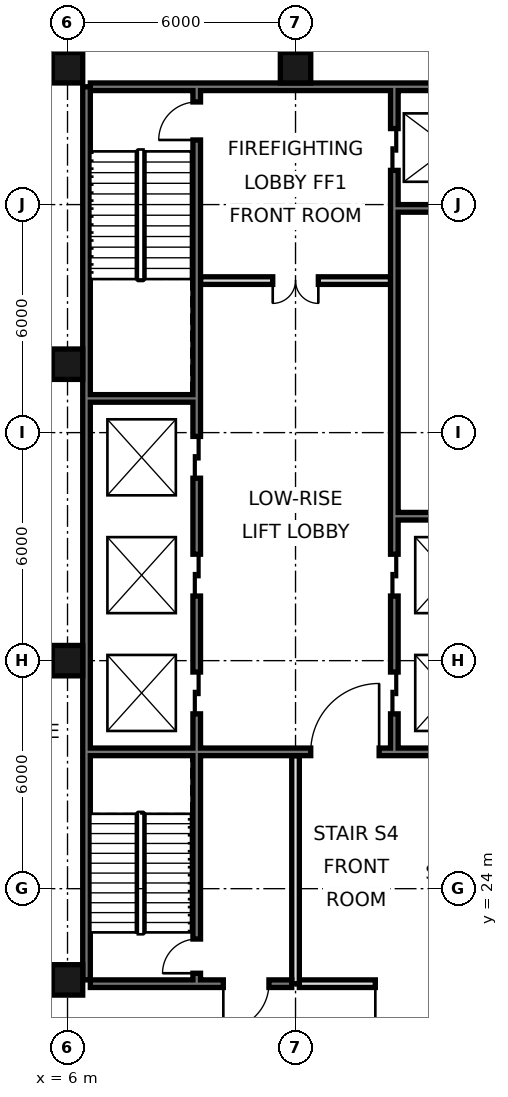
"""IFC4 building model, lengths in metres.
Left out: names, types, materials, properties, quantities, classifications, styles, units other than length and angle.
Written with IfcOpenShell. Run it as: python <this file> out.ifc"""

import sys

from ifc_helpers import new_model, si_unit, direction, frame, frame_2d, origin, origin_2d, place, context, subcontext, project, spatial, rectangle, hollow_rectangle, extrude, element, fill, save


model = new_model("IFC4")
c1 = context("Model", 3, precision=1e-05, world=origin(), true_north=direction((0.0, 1.0)))
c2 = subcontext(c1, "Body", "Model", "MODEL_VIEW")
j1 = project(units=[si_unit("LENGTHUNIT", "METRE"), si_unit("PLANEANGLEUNIT", "RADIAN")], contexts=[c1])
p1 = place(None, origin())
s1 = spatial("IfcSite", under=j1, at=p1, CompositionType="ELEMENT")
p2 = place(p1, origin())
s2 = spatial("IfcBuilding", under=s1, at=p2, CompositionType="ELEMENT")
p3 = place(p2, frame((0.0, 0.0, -13.5)))
s3 = spatial("IfcBuildingStorey", under=s2, at=p3, CompositionType="ELEMENT", Elevation=-13.5)
for number, where, z_axis, x_axis in (
    (1, (6.0, 21.6, 0.0), (0.0, 0.0, 1.0), (1.0, 0.0, 0.0)),
    (2, (6.0, 30.0, 0.0), (0.0, 0.0, 1.0), (1.0, 0.0, 0.0)),
    (3, (6.0, 37.8, 0.0), (0.0, 0.0, 1.0), (1.0, 0.0, 0.0)),
    (4, (6.0, 45.6, 0.0), (0.0, 0.0, 1.0), (1.0, 0.0, 0.0)),
    (5, (12.0, 45.6, 0.0), (0.0, 0.0, 1.0), (1.0, 0.0, 0.0)),
):
    element("IfcColumn", number, at=place(p3, frame(where, z_axis=z_axis, x_axis=x_axis)), inside=s3, PredefinedType="COLUMN", context=c2, shape_type="SweptSolid", body=[
        extrude(hollow_rectangle(XDim=0.8, YDim=0.8, WallThickness=0.07, at=origin_2d()), origin(), (0.0, 0.0, 1.0), 4.5),
    ])
p4 = place(p3, frame((6.5, 21.6, 0.0), z_axis=(0.0, 0.0, 1.0), x_axis=(0.0, 1.0, 0.0)))
e6 = element("IfcWall", 6, at=p4, inside=s3, PredefinedType="SOLIDWALL", context=c2, shape_type="SweptSolid", body=[
    extrude(rectangle(XDim=23.5, YDim=0.2, at=frame_2d((11.75, 0.0))), origin(), (0.0, 0.0, 1.0), 4.15),
])
p5 = place(p3, frame((6.6, 45.1, 0.0), z_axis=(0.0, 0.0, 1.0), x_axis=(1.0, 0.0, 0.0)))
e7 = element("IfcWall", 7, at=p5, inside=s3, PredefinedType="SOLIDWALL", context=c2, shape_type="SweptSolid", body=[
    extrude(rectangle(XDim=34.8, YDim=0.2, at=frame_2d((17.4, 0.0))), origin(), (0.0, 0.0, 1.0), 4.15),
])
p6 = place(p3, frame((12.1, 21.5, 0.0), z_axis=(0.0, 0.0, 1.0), x_axis=(1.0, 0.0, 0.0)))
e8 = element("IfcWall", 8, at=p6, inside=s3, PredefinedType="SOLIDWALL", context=c2, shape_type="SweptSolid", body=[
    extrude(rectangle(XDim=23.8, YDim=0.2, at=frame_2d((11.9, 0.0))), origin(), (0.0, 0.0, 1.0), 3.05),
])
p7 = place(p6, frame((2.0, 0.0, 0.0)))
e9 = element("IfcOpeningElement", 9, at=p7, cuts=e8, PredefinedType="OPENING", context=c2, shape_type="SweptSolid", body=[
    extrude(rectangle(XDim=1.8, YDim=2.1, at=frame_2d((0.9, 1.05))), frame((0.0, 0.11, 0.0), z_axis=(0.0, -1.0, 0.0), x_axis=(1.0, 0.0, 0.0)), (0.0, 0.0, 1.0), 0.22),
])
p8 = place(p6, frame((11.0, 0.0, 0.0)))
e10 = element("IfcOpeningElement", 10, at=p8, cuts=e8, PredefinedType="OPENING", context=c2, shape_type="SweptSolid", body=[
    extrude(rectangle(XDim=1.8, YDim=2.1, at=frame_2d((0.9, 1.05))), frame((0.0, 0.11, 0.0), z_axis=(0.0, -1.0, 0.0), x_axis=(1.0, 0.0, 0.0)), (0.0, 0.0, 1.0), 0.22),
])
p9 = place(p6, frame((20.0, 0.0, 0.0)))
e11 = element("IfcOpeningElement", 11, at=p9, cuts=e8, PredefinedType="OPENING", context=c2, shape_type="SweptSolid", body=[
    extrude(rectangle(XDim=1.8, YDim=2.1, at=frame_2d((0.9, 1.05))), frame((0.0, 0.11, 0.0), z_axis=(0.0, -1.0, 0.0), x_axis=(1.0, 0.0, 0.0)), (0.0, 0.0, 1.0), 0.22),
])
p10 = place(p3, frame((12.0, 21.5, 0.0), z_axis=(0.0, 0.0, 1.0), x_axis=(0.0, 1.0, 0.0)))
e12 = element("IfcWall", 12, at=p10, inside=s3, PredefinedType="PARTITIONING", context=c2, shape_type="SweptSolid", body=[
    extrude(rectangle(XDim=6.0, YDim=0.2, at=frame_2d((3.0, 0.0))), origin(), (0.0, 0.0, 1.0), 3.05),
])
p11 = place(p3, frame((14.6, 27.7, 0.0), z_axis=(0.0, 0.0, 1.0), x_axis=(0.0, 1.0, 0.0)))
e13 = element("IfcWall", 13, at=p11, inside=s3, PredefinedType="SOLIDWALL", context=c2, shape_type="SweptSolid", body=[
    extrude(rectangle(XDim=17.3, YDim=0.2, at=frame_2d((8.65, 0.0))), origin(), (0.0, 0.0, 1.0), 4.15),
])
p12 = place(p11, frame((0.9, 0.0, 0.0)))
e14 = element("IfcOpeningElement", 14, at=p12, cuts=e13, PredefinedType="OPENING", context=c2, shape_type="SweptSolid", body=[
    extrude(rectangle(XDim=1.1, YDim=2.1, at=frame_2d((0.55, 1.05))), frame((0.0, 0.11, 0.0), z_axis=(0.0, -1.0, 0.0), x_axis=(1.0, 0.0, 0.0)), (0.0, 0.0, 1.0), 0.22),
])
p13 = place(p11, frame((4.0, 0.0, 0.0)))
e15 = element("IfcOpeningElement", 15, at=p13, cuts=e13, PredefinedType="OPENING", context=c2, shape_type="SweptSolid", body=[
    extrude(rectangle(XDim=1.1, YDim=2.1, at=frame_2d((0.55, 1.05))), frame((0.0, 0.11, 0.0), z_axis=(0.0, -1.0, 0.0), x_axis=(1.0, 0.0, 0.0)), (0.0, 0.0, 1.0), 0.22),
])
p14 = place(p11, frame((15.2, 0.0, 0.0)))
e16 = element("IfcOpeningElement", 16, at=p14, cuts=e13, PredefinedType="OPENING", context=c2, shape_type="SweptSolid", body=[
    extrude(rectangle(XDim=1.1, YDim=2.1, at=frame_2d((0.55, 1.05))), frame((0.0, 0.11, 0.0), z_axis=(0.0, -1.0, 0.0), x_axis=(1.0, 0.0, 0.0)), (0.0, 0.0, 1.0), 0.22),
])
p15 = place(p3, frame((9.4, 21.5, 0.0), z_axis=(0.0, 0.0, 1.0), x_axis=(0.0, 1.0, 0.0)))
e17 = element("IfcWall", 17, at=p15, inside=s3, PredefinedType="SOLIDWALL", context=c2, shape_type="SweptSolid", body=[
    extrude(rectangle(XDim=23.5, YDim=0.2, at=frame_2d((11.75, 0.0))), origin(), (0.0, 0.0, 1.0), 3.05),
])
p16 = place(p15, frame((7.1, 0.0, 0.0)))
e18 = element("IfcOpeningElement", 18, at=p16, cuts=e17, PredefinedType="OPENING", context=c2, shape_type="SweptSolid", body=[
    extrude(rectangle(XDim=1.1, YDim=2.1, at=frame_2d((0.55, 1.05))), frame((0.0, 0.11, 0.0), z_axis=(0.0, -1.0, 0.0), x_axis=(1.0, 0.0, 0.0)), (0.0, 0.0, 1.0), 0.22),
])
p17 = place(p15, frame((10.2, 0.0, 0.0)))
e19 = element("IfcOpeningElement", 19, at=p17, cuts=e17, PredefinedType="OPENING", context=c2, shape_type="SweptSolid", body=[
    extrude(rectangle(XDim=1.1, YDim=2.1, at=frame_2d((0.55, 1.05))), frame((0.0, 0.11, 0.0), z_axis=(0.0, -1.0, 0.0), x_axis=(1.0, 0.0, 0.0)), (0.0, 0.0, 1.0), 0.22),
])
p18 = place(p15, frame((13.3, 0.0, 0.0)))
e20 = element("IfcOpeningElement", 20, at=p18, cuts=e17, PredefinedType="OPENING", context=c2, shape_type="SweptSolid", body=[
    extrude(rectangle(XDim=1.1, YDim=2.1, at=frame_2d((0.55, 1.05))), frame((0.0, 0.11, 0.0), z_axis=(0.0, -1.0, 0.0), x_axis=(1.0, 0.0, 0.0)), (0.0, 0.0, 1.0), 0.22),
])
p19 = place(p15, frame((22.2, 0.0, 0.0)))
e21 = element("IfcOpeningElement", 21, at=p19, cuts=e17, PredefinedType="OPENING", context=c2, shape_type="SweptSolid", body=[
    extrude(rectangle(XDim=1.0, YDim=2.1, at=frame_2d((0.5, 1.05))), frame((0.0, 0.11, 0.0), z_axis=(0.0, -1.0, 0.0), x_axis=(1.0, 0.0, 0.0)), (0.0, 0.0, 1.0), 0.22),
])
p20 = place(p15, frame((0.275, 0.0, 0.0)))
e22 = element("IfcOpeningElement", 22, at=p20, cuts=e17, PredefinedType="OPENING", context=c2, shape_type="SweptSolid", body=[
    extrude(rectangle(XDim=0.9, YDim=2.1, at=frame_2d((0.45, 1.05))), frame((0.0, 0.11, 0.0), z_axis=(0.0, -1.0, 0.0), x_axis=(1.0, 0.0, 0.0)), (0.0, 0.0, 1.0), 0.22),
])
p21 = place(p3, frame((6.6, 21.5, 0.0), z_axis=(0.0, 0.0, 1.0), x_axis=(1.0, 0.0, 0.0)))
e23 = element("IfcWall", 23, at=p21, inside=s3, PredefinedType="SOLIDWALL", context=c2, shape_type="SweptSolid", body=[
    extrude(rectangle(XDim=5.3, YDim=0.2, at=frame_2d((2.65, 0.0))), origin(), (0.0, 0.0, 1.0), 3.05),
])
p22 = place(p21, frame((3.5, 0.0, 0.0)))
e24 = element("IfcOpeningElement", 24, at=p22, cuts=e23, PredefinedType="OPENING", context=c2, shape_type="SweptSolid", body=[
    extrude(rectangle(XDim=1.2, YDim=2.1, at=frame_2d((0.6, 1.05))), frame((0.0, 0.11, 0.0), z_axis=(0.0, -1.0, 0.0), x_axis=(1.0, 0.0, 0.0)), (0.0, 0.0, 1.0), 0.22),
])
p23 = place(p3, frame((6.6, 27.6, 0.0), z_axis=(0.0, 0.0, 1.0), x_axis=(1.0, 0.0, 0.0)))
e25 = element("IfcWall", 25, at=p23, inside=s3, PredefinedType="SOLIDWALL", context=c2, shape_type="SweptSolid", body=[
    extrude(rectangle(XDim=10.8, YDim=0.2, at=frame_2d((5.4, 0.0))), origin(), (0.0, 0.0, 1.0), 4.15),
])
p24 = place(p23, frame((5.8, 0.0, 0.0)))
e26 = element("IfcOpeningElement", 26, at=p24, cuts=e25, PredefinedType="OPENING", context=c2, shape_type="SweptSolid", body=[
    extrude(rectangle(XDim=1.8, YDim=2.1, at=frame_2d((0.9, 1.05))), frame((0.0, 0.11, 0.0), z_axis=(0.0, -1.0, 0.0), x_axis=(1.0, 0.0, 0.0)), (0.0, 0.0, 1.0), 0.22),
])
for number, where, z_axis, x_axis in (
    (27, (14.7, 33.8, 0.0), (0.0, 0.0, 1.0), (1.0, 0.0, 0.0)),
    (28, (6.6, 36.9, 0.0), (0.0, 0.0, 1.0), (1.0, 0.0, 0.0)),
):
    element("IfcWall", number, at=place(p3, frame(where, z_axis=z_axis, x_axis=x_axis)), inside=s3, PredefinedType="SOLIDWALL", context=c2, shape_type="SweptSolid", body=[
        extrude(rectangle(XDim=2.7, YDim=0.2, at=frame_2d((1.35, 0.0))), origin(), (0.0, 0.0, 1.0), 4.15),
    ])
p25 = place(p3, frame((9.5, 40.0, 0.0), z_axis=(0.0, 0.0, 1.0), x_axis=(1.0, 0.0, 0.0)))
e29 = element("IfcWall", 29, at=p25, inside=s3, PredefinedType="PARTITIONING", context=c2, shape_type="SweptSolid", body=[
    extrude(rectangle(XDim=5.0, YDim=0.2, at=frame_2d((2.5, 0.0))), origin(), (0.0, 0.0, 1.0), 4.15),
])
p26 = place(p25, frame((1.9, 0.0, 0.0)))
e30 = element("IfcOpeningElement", 30, at=p26, cuts=e29, PredefinedType="OPENING", context=c2, shape_type="SweptSolid", body=[
    extrude(rectangle(XDim=1.2, YDim=2.1, at=frame_2d((0.6, 1.05))), frame((0.0, 0.11, 0.0), z_axis=(0.0, -1.0, 0.0), x_axis=(1.0, 0.0, 0.0)), (0.0, 0.0, 1.0), 0.22),
])
p27 = place(p3, frame((14.7, 41.9, 0.0), z_axis=(0.0, 0.0, 1.0), x_axis=(1.0, 0.0, 0.0)))
e31 = element("IfcWall", 31, at=p27, inside=s3, PredefinedType="SOLIDWALL", context=c2, shape_type="SweptSolid", body=[
    extrude(rectangle(XDim=2.7, YDim=0.2, at=frame_2d((1.35, 0.0))), origin(), (0.0, 0.0, 1.0), 4.15),
])
p28 = place(p7, frame((1.8, 0.0, 0.0), z_axis=(0.0, 0.0, 1.0), x_axis=(-1.0, 0.0, 0.0)))
e32 = element("IfcDoor", 32, at=p28, inside=s3, OperationType="SINGLE_SWING_RIGHT", PredefinedType="DOOR", context=c2, shape_type="SweptSolid", body=[
    extrude(rectangle(XDim=1.8, YDim=2.1, at=frame_2d((0.9, 1.05))), frame((0.0, 0.025, 0.0), z_axis=(0.0, -1.0, 0.0), x_axis=(1.0, 0.0, 0.0)), (0.0, 0.0, 1.0), 0.05),
])
fill(e9, e32)
p29 = place(p22, frame((1.2, 0.0, 0.0), z_axis=(0.0, 0.0, 1.0), x_axis=(-1.0, 0.0, 0.0)))
e33 = element("IfcDoor", 33, at=p29, inside=s3, OperationType="SINGLE_SWING_RIGHT", PredefinedType="DOOR", context=c2, shape_type="SweptSolid", body=[
    extrude(rectangle(XDim=1.2, YDim=2.1, at=frame_2d((0.6, 1.05))), frame((0.0, 0.025, 0.0), z_axis=(0.0, -1.0, 0.0), x_axis=(1.0, 0.0, 0.0)), (0.0, 0.0, 1.0), 0.05),
])
fill(e24, e33)
p30 = place(p24, frame((1.8, 0.0, 0.0), z_axis=(0.0, 0.0, 1.0), x_axis=(-1.0, 0.0, 0.0)))
e34 = element("IfcDoor", 34, at=p30, inside=s3, OperationType="SINGLE_SWING_LEFT", PredefinedType="DOOR", context=c2, shape_type="SweptSolid", body=[
    extrude(rectangle(XDim=1.8, YDim=2.1, at=frame_2d((0.9, 1.05))), frame((0.0, 0.025, 0.0), z_axis=(0.0, -1.0, 0.0), x_axis=(1.0, 0.0, 0.0)), (0.0, 0.0, 1.0), 0.05),
])
fill(e26, e34)
p31 = place(p26, frame((1.2, 0.0, 0.0), z_axis=(0.0, 0.0, 1.0), x_axis=(-1.0, 0.0, 0.0)))
e35 = element("IfcDoor", 35, at=p31, inside=s3, OperationType="DOUBLE_DOOR_SINGLE_SWING", PredefinedType="DOOR", context=c2, shape_type="SweptSolid", body=[
    extrude(rectangle(XDim=1.2, YDim=2.1, at=frame_2d((0.6, 1.05))), frame((0.0, 0.025, 0.0), z_axis=(0.0, -1.0, 0.0), x_axis=(1.0, 0.0, 0.0)), (0.0, 0.0, 1.0), 0.05),
])
fill(e30, e35)
p32 = place(p12, origin())
e36 = element("IfcDoor", 36, at=p32, inside=s3, OperationType="DOUBLE_DOOR_SLIDING", PredefinedType="DOOR", context=c2, shape_type="SweptSolid", body=[
    extrude(rectangle(XDim=1.1, YDim=2.1, at=frame_2d((0.55, 1.05))), frame((0.0, 0.025, 0.0), z_axis=(0.0, -1.0, 0.0), x_axis=(1.0, 0.0, 0.0)), (0.0, 0.0, 1.0), 0.05),
])
fill(e14, e36)
p33 = place(p13, origin())
e37 = element("IfcDoor", 37, at=p33, inside=s3, OperationType="DOUBLE_DOOR_SLIDING", PredefinedType="DOOR", context=c2, shape_type="SweptSolid", body=[
    extrude(rectangle(XDim=1.1, YDim=2.1, at=frame_2d((0.55, 1.05))), frame((0.0, 0.025, 0.0), z_axis=(0.0, -1.0, 0.0), x_axis=(1.0, 0.0, 0.0)), (0.0, 0.0, 1.0), 0.05),
])
fill(e15, e37)
p34 = place(p14, origin())
e38 = element("IfcDoor", 38, at=p34, inside=s3, OperationType="DOUBLE_DOOR_SLIDING", PredefinedType="DOOR", context=c2, shape_type="SweptSolid", body=[
    extrude(rectangle(XDim=1.1, YDim=2.1, at=frame_2d((0.55, 1.05))), frame((0.0, 0.025, 0.0), z_axis=(0.0, -1.0, 0.0), x_axis=(1.0, 0.0, 0.0)), (0.0, 0.0, 1.0), 0.05),
])
fill(e16, e38)
p35 = place(p16, origin())
e39 = element("IfcDoor", 39, at=p35, inside=s3, OperationType="DOUBLE_DOOR_SLIDING", PredefinedType="DOOR", context=c2, shape_type="SweptSolid", body=[
    extrude(rectangle(XDim=1.1, YDim=2.1, at=frame_2d((0.55, 1.05))), frame((0.0, 0.025, 0.0), z_axis=(0.0, -1.0, 0.0), x_axis=(1.0, 0.0, 0.0)), (0.0, 0.0, 1.0), 0.05),
])
fill(e18, e39)
p36 = place(p17, origin())
e40 = element("IfcDoor", 40, at=p36, inside=s3, OperationType="DOUBLE_DOOR_SLIDING", PredefinedType="DOOR", context=c2, shape_type="SweptSolid", body=[
    extrude(rectangle(XDim=1.1, YDim=2.1, at=frame_2d((0.55, 1.05))), frame((0.0, 0.025, 0.0), z_axis=(0.0, -1.0, 0.0), x_axis=(1.0, 0.0, 0.0)), (0.0, 0.0, 1.0), 0.05),
])
fill(e19, e40)
p37 = place(p18, origin())
e41 = element("IfcDoor", 41, at=p37, inside=s3, OperationType="DOUBLE_DOOR_SLIDING", PredefinedType="DOOR", context=c2, shape_type="SweptSolid", body=[
    extrude(rectangle(XDim=1.1, YDim=2.1, at=frame_2d((0.55, 1.05))), frame((0.0, 0.025, 0.0), z_axis=(0.0, -1.0, 0.0), x_axis=(1.0, 0.0, 0.0)), (0.0, 0.0, 1.0), 0.05),
])
fill(e20, e41)
p38 = place(p19, origin())
e42 = element("IfcDoor", 42, at=p38, inside=s3, OperationType="SINGLE_SWING_LEFT", PredefinedType="DOOR", context=c2, shape_type="SweptSolid", body=[
    extrude(rectangle(XDim=1.0, YDim=2.1, at=frame_2d((0.5, 1.05))), frame((0.0, 0.025, 0.0), z_axis=(0.0, -1.0, 0.0), x_axis=(1.0, 0.0, 0.0)), (0.0, 0.0, 1.0), 0.05),
])
fill(e21, e42)
p39 = place(p20, origin())
e43 = element("IfcDoor", 43, at=p39, inside=s3, OperationType="SINGLE_SWING_LEFT", PredefinedType="DOOR", context=c2, shape_type="SweptSolid", body=[
    extrude(rectangle(XDim=0.9, YDim=2.1, at=frame_2d((0.45, 1.05))), frame((0.0, 0.025, 0.0), z_axis=(0.0, -1.0, 0.0), x_axis=(1.0, 0.0, 0.0)), (0.0, 0.0, 1.0), 0.05),
])
fill(e22, e43)
save(model, sys.argv[1])
